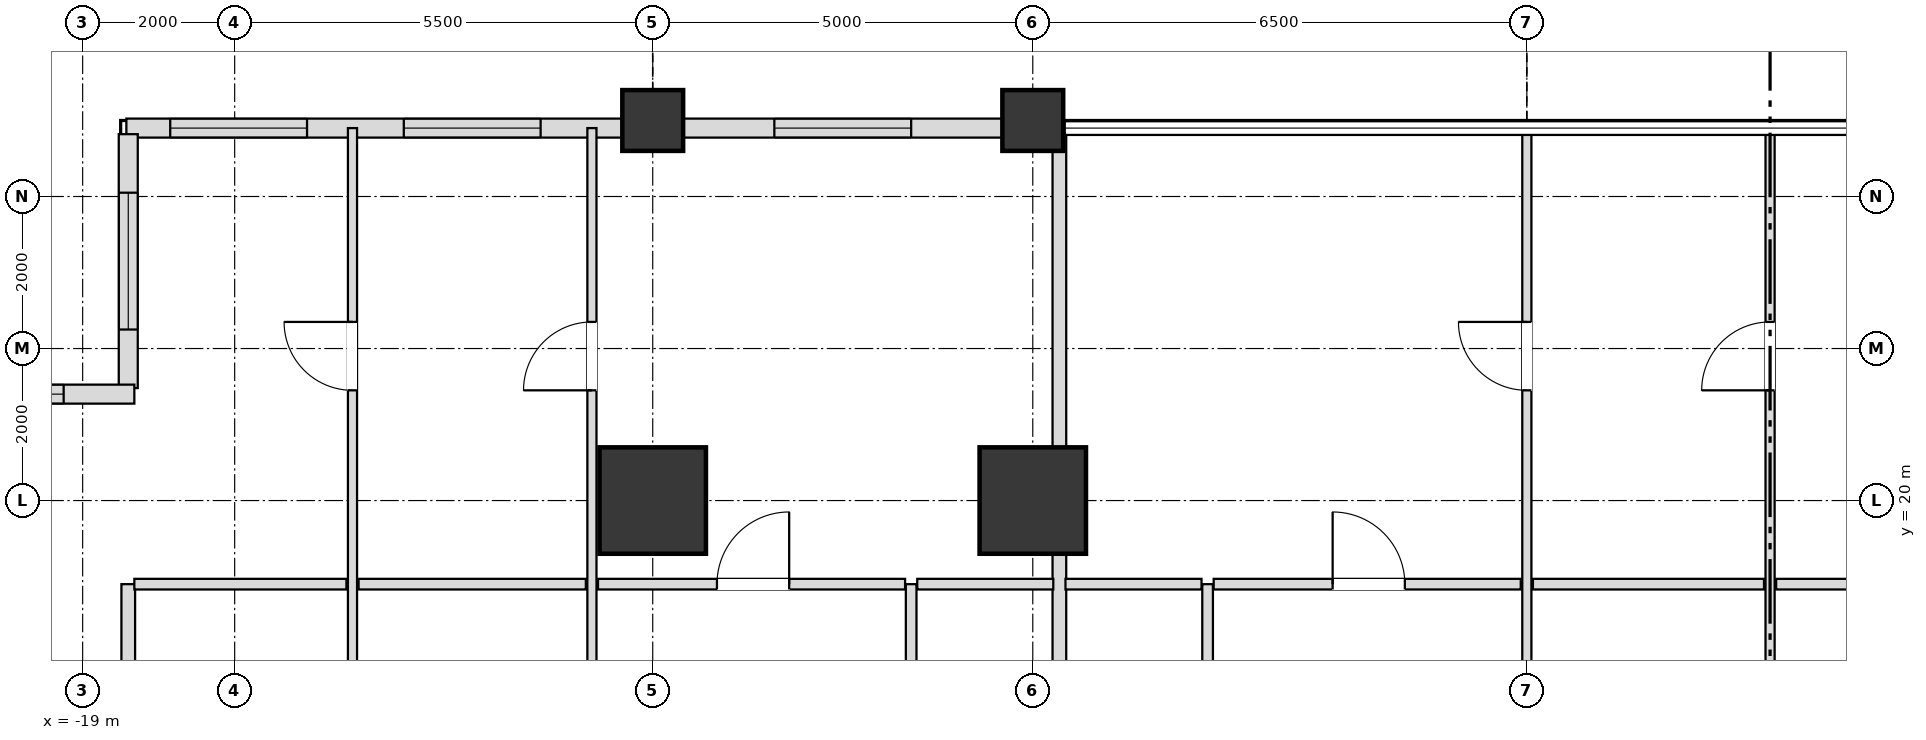
"""IFC4 building model, lengths in metres.
Left out: names, types, materials, properties, quantities, classifications, styles, units other than length and angle.
Written with IfcOpenShell. Run it as: python <this file> out.ifc"""

import sys

from ifc_helpers import new_model, si_unit, direction, frame, frame_2d, origin, origin_2d, place, context, subcontext, project, spatial, rectangle, extrude, element, fill, save


model = new_model("IFC4")
c1 = context("Model", 3, precision=1e-05, world=origin(), true_north=direction((0.0, 1.0)))
c2 = subcontext(c1, "Body", "Model", "MODEL_VIEW")
j1 = project(units=[si_unit("LENGTHUNIT", "METRE"), si_unit("PLANEANGLEUNIT", "RADIAN")], contexts=[c1])
p1 = place(None, origin())
s1 = spatial("IfcSite", under=j1, at=p1, CompositionType="ELEMENT")
p2 = place(p1, origin())
s2 = spatial("IfcBuilding", under=s1, at=p2, CompositionType="ELEMENT")
p3 = place(p2, frame((0.0, 0.0, 39.6)))
s3 = spatial("IfcBuildingStorey", under=s2, at=p3, CompositionType="ELEMENT", Elevation=39.6)
for number, where, z_axis, x_axis in (
    (1, (-6.5, 20.0, 0.0), (0.0, 0.0, 1.0), (1.0, 0.0, 0.0)),
    (2, (-11.5, 20.0, 0.0), (0.0, 0.0, 1.0), (1.0, 0.0, 0.0)),
):
    element("IfcColumn", number, at=place(p3, frame(where, z_axis=z_axis, x_axis=x_axis)), inside=s3, PredefinedType="USERDEFINED", context=c2, shape_type="SweptSolid", body=[
        extrude(rectangle(XDim=1.4, YDim=1.4, at=origin_2d()), origin(), (0.0, 0.0, 1.0), 3.6),
    ])
for number, where, z_axis, x_axis in (
    (3, (-11.5, 25.0, 0.0), (0.0, 0.0, 1.0), (1.0, 0.0, 0.0)),
    (4, (-6.5, 25.0, 0.0), (0.0, 0.0, 1.0), (1.0, 0.0, 0.0)),
):
    element("IfcColumn", number, at=place(p3, frame(where, z_axis=z_axis, x_axis=x_axis)), inside=s3, PredefinedType="COLUMN", context=c2, shape_type="SweptSolid", body=[
        extrude(rectangle(XDim=0.8, YDim=0.8, at=origin_2d()), origin(), (0.0, 0.0, 1.0), 3.6),
    ])
p4 = place(p3, frame((-6.895, 24.9, 0.0), z_axis=(0.0, 0.0, 1.0), x_axis=(-1.0, 0.0, 0.0)))
e5 = element("IfcWall", 5, at=p4, inside=s3, PredefinedType="SOLIDWALL", context=c2, shape_type="SweptSolid", body=[
    extrude(rectangle(XDim=4.21, YDim=0.25, at=frame_2d((2.105, 0.0))), origin(), (0.0, 0.0, 1.0), 2.736),
])
p5 = place(p4, frame((1.205, 0.0, 0.72)))
e6 = element("IfcOpeningElement", 6, at=p5, cuts=e5, PredefinedType="OPENING", context=c2, shape_type="SweptSolid", body=[
    extrude(rectangle(XDim=1.8, YDim=1.68, at=frame_2d((0.9, 0.84))), frame((0.0, 0.135, 0.0), z_axis=(0.0, -1.0, 0.0), x_axis=(1.0, 0.0, 0.0)), (0.0, 0.0, 1.0), 0.27),
])
p6 = place(p3, frame((-11.895, 24.9, 0.0), z_axis=(0.0, 0.0, 1.0), x_axis=(-1.0, 0.0, 0.0)))
e7 = element("IfcWall", 7, at=p6, inside=s3, PredefinedType="SOLIDWALL", context=c2, shape_type="SweptSolid", body=[
    extrude(rectangle(XDim=6.53, YDim=0.25, at=frame_2d((3.265, 0.0))), origin(), (0.0, 0.0, 1.0), 2.736),
])
p7 = place(p6, frame((1.08, 0.0, 0.72)))
e8 = element("IfcOpeningElement", 8, at=p7, cuts=e7, PredefinedType="OPENING", context=c2, shape_type="SweptSolid", body=[
    extrude(rectangle(XDim=1.8, YDim=1.68, at=frame_2d((0.9, 0.84))), frame((0.0, 0.135, 0.0), z_axis=(0.0, -1.0, 0.0), x_axis=(1.0, 0.0, 0.0)), (0.0, 0.0, 1.0), 0.27),
])
p8 = place(p6, frame((4.153, 0.0, 0.72)))
e9 = element("IfcOpeningElement", 9, at=p8, cuts=e7, PredefinedType="OPENING", context=c2, shape_type="SweptSolid", body=[
    extrude(rectangle(XDim=1.8, YDim=1.68, at=frame_2d((0.9, 0.84))), frame((0.0, 0.135, 0.0), z_axis=(0.0, -1.0, 0.0), x_axis=(1.0, 0.0, 0.0)), (0.0, 0.0, 1.0), 0.27),
])
p9 = place(p3, frame((-18.4, 24.82, 0.0), z_axis=(0.0, 0.0, 1.0), x_axis=(0.0, -1.0, 0.0)))
e10 = element("IfcWall", 10, at=p9, inside=s3, PredefinedType="SOLIDWALL", context=c2, shape_type="SweptSolid", body=[
    extrude(rectangle(XDim=3.34, YDim=0.25, at=frame_2d((1.67, 0.0))), origin(), (0.0, 0.0, 1.0), 2.736),
])
p10 = place(p9, frame((0.77, 0.0, 0.72)))
e11 = element("IfcOpeningElement", 11, at=p10, cuts=e10, PredefinedType="OPENING", context=c2, shape_type="SweptSolid", body=[
    extrude(rectangle(XDim=1.8, YDim=1.68, at=frame_2d((0.9, 0.84))), frame((0.0, 0.135, 0.0), z_axis=(0.0, -1.0, 0.0), x_axis=(1.0, 0.0, 0.0)), (0.0, 0.0, 1.0), 0.27),
])
p11 = place(p3, frame((-18.32, 21.4, 0.0), z_axis=(0.0, 0.0, 1.0), x_axis=(-1.0, 0.0, 0.0)))
e12 = element("IfcWall", 12, at=p11, inside=s3, PredefinedType="SOLIDWALL", context=c2, shape_type="SweptSolid", body=[
    extrude(rectangle(XDim=3.66, YDim=0.25, at=frame_2d((1.83, 0.0))), origin(), (0.0, 0.0, 1.0), 2.736),
])
p12 = place(p11, frame((0.93, 0.0, 0.72)))
e13 = element("IfcOpeningElement", 13, at=p12, cuts=e12, PredefinedType="OPENING", context=c2, shape_type="SweptSolid", body=[
    extrude(rectangle(XDim=1.8, YDim=1.68, at=frame_2d((0.9, 0.84))), frame((0.0, 0.135, 0.0), z_axis=(0.0, -1.0, 0.0), x_axis=(1.0, 0.0, 0.0)), (0.0, 0.0, 1.0), 0.27),
])
p13 = place(p3, frame((-18.4, 9.3, 0.0), z_axis=(0.0, 0.0, 1.0), x_axis=(0.0, 1.0, 0.0)))
e14 = element("IfcWall", 14, at=p13, inside=s3, PredefinedType="PARTITIONING", context=c2, shape_type="SweptSolid", body=[
    extrude(rectangle(XDim=9.6, YDim=0.18, at=frame_2d((4.8, 0.0))), origin(), (0.0, 0.0, 1.0), 2.736),
])
p14 = place(p3, frame((-15.45, 9.3, 0.0), z_axis=(0.0, 0.0, 1.0), x_axis=(0.0, 1.0, 0.0)))
e15 = element("IfcWall", 15, at=p14, inside=s3, PredefinedType="PARTITIONING", context=c2, shape_type="SweptSolid", body=[
    extrude(rectangle(XDim=15.6, YDim=0.12, at=frame_2d((7.8, 0.0))), origin(), (0.0, 0.0, 1.0), 2.736),
])
p15 = place(p14, frame((4.478, 0.0, 0.0)))
e16 = element("IfcOpeningElement", 16, at=p15, cuts=e15, PredefinedType="OPENING", context=c2, shape_type="SweptSolid", body=[
    extrude(rectangle(XDim=0.9, YDim=2.1, at=frame_2d((0.45, 1.05))), frame((0.0, 0.07, 0.0), z_axis=(0.0, -1.0, 0.0), x_axis=(1.0, 0.0, 0.0)), (0.0, 0.0, 1.0), 0.14),
])
p16 = place(p14, frame((12.15, 0.0, 0.0)))
e17 = element("IfcOpeningElement", 17, at=p16, cuts=e15, PredefinedType="OPENING", context=c2, shape_type="SweptSolid", body=[
    extrude(rectangle(XDim=0.9, YDim=2.1, at=frame_2d((0.45, 1.05))), frame((0.0, 0.07, 0.0), z_axis=(0.0, -1.0, 0.0), x_axis=(1.0, 0.0, 0.0)), (0.0, 0.0, 1.0), 0.14),
])
p17 = place(p3, frame((-12.3, 9.3, 0.0), z_axis=(0.0, 0.0, 1.0), x_axis=(0.0, 1.0, 0.0)))
e18 = element("IfcWall", 18, at=p17, inside=s3, PredefinedType="PARTITIONING", context=c2, shape_type="SweptSolid", body=[
    extrude(rectangle(XDim=15.6, YDim=0.12, at=frame_2d((7.8, 0.0))), origin(), (0.0, 0.0, 1.0), 2.736),
])
p18 = place(p17, frame((4.325, 0.0, 0.0)))
e19 = element("IfcOpeningElement", 19, at=p18, cuts=e18, PredefinedType="OPENING", context=c2, shape_type="SweptSolid", body=[
    extrude(rectangle(XDim=0.95, YDim=2.1, at=frame_2d((0.475, 1.05))), frame((0.0, 0.07, 0.0), z_axis=(0.0, -1.0, 0.0), x_axis=(1.0, 0.0, 0.0)), (0.0, 0.0, 1.0), 0.14),
])
p19 = place(p17, frame((12.15, 0.0, 0.0)))
e20 = element("IfcOpeningElement", 20, at=p19, cuts=e18, PredefinedType="OPENING", context=c2, shape_type="SweptSolid", body=[
    extrude(rectangle(XDim=0.9, YDim=2.1, at=frame_2d((0.45, 1.05))), frame((0.0, 0.07, 0.0), z_axis=(0.0, -1.0, 0.0), x_axis=(1.0, 0.0, 0.0)), (0.0, 0.0, 1.0), 0.14),
])
p20 = place(p3, frame((-8.1, 9.3, 0.0), z_axis=(0.0, 0.0, 1.0), x_axis=(0.0, 1.0, 0.0)))
e21 = element("IfcWall", 21, at=p20, inside=s3, PredefinedType="PARTITIONING", context=c2, shape_type="SweptSolid", body=[
    extrude(rectangle(XDim=9.6, YDim=0.14, at=frame_2d((4.8, 0.0))), origin(), (0.0, 0.0, 1.0), 2.816),
])
p21 = place(p20, frame((4.35, 0.0, 0.0)))
e22 = element("IfcOpeningElement", 22, at=p21, cuts=e21, PredefinedType="OPENING", context=c2, shape_type="SweptSolid", body=[
    extrude(rectangle(XDim=0.9, YDim=2.1, at=frame_2d((0.45, 1.05))), frame((0.0, 0.08, 0.0), z_axis=(0.0, -1.0, 0.0), x_axis=(1.0, 0.0, 0.0)), (0.0, 0.0, 1.0), 0.16),
])
p22 = place(p3, frame((-6.15, 9.3, 0.0), z_axis=(0.0, 0.0, 1.0), x_axis=(0.0, 1.0, 0.0)))
e23 = element("IfcWall", 23, at=p22, inside=s3, PredefinedType="PARTITIONING", context=c2, shape_type="SweptSolid", body=[
    extrude(rectangle(XDim=15.6, YDim=0.18, at=frame_2d((7.8, 0.0))), origin(), (0.0, 0.0, 1.0), 2.816),
])
p23 = place(p3, frame((-4.2, 9.3, 0.0), z_axis=(0.0, 0.0, 1.0), x_axis=(0.0, 1.0, 0.0)))
e24 = element("IfcWall", 24, at=p23, inside=s3, PredefinedType="PARTITIONING", context=c2, shape_type="SweptSolid", body=[
    extrude(rectangle(XDim=9.6, YDim=0.14, at=frame_2d((4.8, 0.0))), origin(), (0.0, 0.0, 1.0), 2.948),
])
p24 = place(p23, frame((4.35, 0.0, 0.0)))
e25 = element("IfcOpeningElement", 25, at=p24, cuts=e24, PredefinedType="OPENING", context=c2, shape_type="SweptSolid", body=[
    extrude(rectangle(XDim=0.9, YDim=2.1, at=frame_2d((0.45, 1.05))), frame((0.0, 0.08, 0.0), z_axis=(0.0, -1.0, 0.0), x_axis=(1.0, 0.0, 0.0)), (0.0, 0.0, 1.0), 0.16),
])
p25 = place(p3, frame((0.0, 9.3, 0.0), z_axis=(0.0, 0.0, 1.0), x_axis=(0.0, 1.0, 0.0)))
e26 = element("IfcWall", 26, at=p25, inside=s3, PredefinedType="PARTITIONING", context=c2, shape_type="SweptSolid", body=[
    extrude(rectangle(XDim=15.6, YDim=0.12, at=frame_2d((7.8, 0.0))), origin(), (0.0, 0.0, 1.0), 2.816),
])
p26 = place(p25, frame((4.325, 0.0, 0.0)))
e27 = element("IfcOpeningElement", 27, at=p26, cuts=e26, PredefinedType="OPENING", context=c2, shape_type="SweptSolid", body=[
    extrude(rectangle(XDim=0.95, YDim=2.1, at=frame_2d((0.475, 1.05))), frame((0.0, 0.07, 0.0), z_axis=(0.0, -1.0, 0.0), x_axis=(1.0, 0.0, 0.0)), (0.0, 0.0, 1.0), 0.14),
])
p27 = place(p25, frame((12.15, 0.0, 0.0)))
e28 = element("IfcOpeningElement", 28, at=p27, cuts=e26, PredefinedType="OPENING", context=c2, shape_type="SweptSolid", body=[
    extrude(rectangle(XDim=0.9, YDim=2.1, at=frame_2d((0.45, 1.05))), frame((0.0, 0.07, 0.0), z_axis=(0.0, -1.0, 0.0), x_axis=(1.0, 0.0, 0.0)), (0.0, 0.0, 1.0), 0.14),
])
p28 = place(p3, frame((3.2, 9.3, 0.0), z_axis=(0.0, 0.0, 1.0), x_axis=(0.0, 1.0, 0.0)))
e29 = element("IfcWall", 29, at=p28, inside=s3, PredefinedType="PARTITIONING", context=c2, shape_type="SweptSolid", body=[
    extrude(rectangle(XDim=15.6, YDim=0.12, at=frame_2d((7.8, 0.0))), origin(), (0.0, 0.0, 1.0), 2.816),
])
p29 = place(p28, frame((4.35, 0.0, 0.0)))
e30 = element("IfcOpeningElement", 30, at=p29, cuts=e29, PredefinedType="OPENING", context=c2, shape_type="SweptSolid", body=[
    extrude(rectangle(XDim=0.9, YDim=2.1, at=frame_2d((0.45, 1.05))), frame((0.0, 0.07, 0.0), z_axis=(0.0, -1.0, 0.0), x_axis=(1.0, 0.0, 0.0)), (0.0, 0.0, 1.0), 0.14),
])
p30 = place(p28, frame((12.15, 0.0, 0.0)))
e31 = element("IfcOpeningElement", 31, at=p30, cuts=e29, PredefinedType="OPENING", context=c2, shape_type="SweptSolid", body=[
    extrude(rectangle(XDim=0.9, YDim=2.1, at=frame_2d((0.45, 1.05))), frame((0.0, 0.07, 0.0), z_axis=(0.0, -1.0, 0.0), x_axis=(1.0, 0.0, 0.0)), (0.0, 0.0, 1.0), 0.14),
])
p31 = place(p3, frame((-18.32, 18.9, 0.0), z_axis=(0.0, 0.0, 1.0), x_axis=(1.0, 0.0, 0.0)))
e32 = element("IfcWall", 32, at=p31, inside=s3, PredefinedType="PARTITIONING", context=c2, shape_type="SweptSolid", body=[
    extrude(rectangle(XDim=2.79, YDim=0.14, at=frame_2d((1.395, 0.0))), origin(), (0.0, 0.0, 1.0), 2.736),
])
p32 = place(p3, frame((-15.37, 18.9, 0.0), z_axis=(0.0, 0.0, 1.0), x_axis=(1.0, 0.0, 0.0)))
e33 = element("IfcWall", 33, at=p32, inside=s3, PredefinedType="PARTITIONING", context=c2, shape_type="SweptSolid", body=[
    extrude(rectangle(XDim=2.99, YDim=0.14, at=frame_2d((1.495, 0.0))), origin(), (0.0, 0.0, 1.0), 2.736),
])
p33 = place(p3, frame((-12.22, 18.9, 0.0), z_axis=(0.0, 0.0, 1.0), x_axis=(1.0, 0.0, 0.0)))
e34 = element("IfcWall", 34, at=p33, inside=s3, PredefinedType="PARTITIONING", context=c2, shape_type="SweptSolid", body=[
    extrude(rectangle(XDim=4.04, YDim=0.14, at=frame_2d((2.02, 0.0))), origin(), (0.0, 0.0, 1.0), 2.736),
])
p34 = place(p33, frame((1.565, 0.0, 0.0)))
e35 = element("IfcOpeningElement", 35, at=p34, cuts=e34, PredefinedType="OPENING", context=c2, shape_type="SweptSolid", body=[
    extrude(rectangle(XDim=0.95, YDim=2.1, at=frame_2d((0.475, 1.05))), frame((0.0, 0.08, 0.0), z_axis=(0.0, -1.0, 0.0), x_axis=(1.0, 0.0, 0.0)), (0.0, 0.0, 1.0), 0.16),
])
p35 = place(p3, frame((-8.02, 18.9, 0.0), z_axis=(0.0, 0.0, 1.0), x_axis=(1.0, 0.0, 0.0)))
e36 = element("IfcWall", 36, at=p35, inside=s3, PredefinedType="PARTITIONING", context=c2, shape_type="SweptSolid", body=[
    extrude(rectangle(XDim=1.79, YDim=0.14, at=frame_2d((0.895, 0.0))), origin(), (0.0, 0.0, 1.0), 2.816),
])
p36 = place(p3, frame((-6.07, 18.9, 0.0), z_axis=(0.0, 0.0, 1.0), x_axis=(1.0, 0.0, 0.0)))
e37 = element("IfcWall", 37, at=p36, inside=s3, PredefinedType="PARTITIONING", context=c2, shape_type="SweptSolid", body=[
    extrude(rectangle(XDim=1.79, YDim=0.14, at=frame_2d((0.895, 0.0))), origin(), (0.0, 0.0, 1.0), 3.38),
])
p37 = place(p3, frame((-4.12, 18.9, 0.0), z_axis=(0.0, 0.0, 1.0), x_axis=(1.0, 0.0, 0.0)))
e38 = element("IfcWall", 38, at=p37, inside=s3, PredefinedType="PARTITIONING", context=c2, shape_type="SweptSolid", body=[
    extrude(rectangle(XDim=4.04, YDim=0.14, at=frame_2d((2.02, 0.0))), origin(), (0.0, 0.0, 1.0), 3.38),
])
p38 = place(p37, frame((1.565, 0.0, 0.0)))
e39 = element("IfcOpeningElement", 39, at=p38, cuts=e38, PredefinedType="OPENING", context=c2, shape_type="SweptSolid", body=[
    extrude(rectangle(XDim=0.95, YDim=2.1, at=frame_2d((0.475, 1.05))), frame((0.0, 0.08, 0.0), z_axis=(0.0, -1.0, 0.0), x_axis=(1.0, 0.0, 0.0)), (0.0, 0.0, 1.0), 0.16),
])
p39 = place(p3, frame((0.08, 18.9, 0.0), z_axis=(0.0, 0.0, 1.0), x_axis=(1.0, 0.0, 0.0)))
e40 = element("IfcWall", 40, at=p39, inside=s3, PredefinedType="PARTITIONING", context=c2, shape_type="SweptSolid", body=[
    extrude(rectangle(XDim=3.04, YDim=0.14, at=frame_2d((1.52, 0.0))), origin(), (0.0, 0.0, 1.0), 3.38),
])
p40 = place(p3, frame((3.28, 18.9, 0.0), z_axis=(0.0, 0.0, 1.0), x_axis=(1.0, 0.0, 0.0)))
e41 = element("IfcWall", 41, at=p40, inside=s3, PredefinedType="PARTITIONING", context=c2, shape_type="SweptSolid", body=[
    extrude(rectangle(XDim=2.79, YDim=0.14, at=frame_2d((1.395, 0.0))), origin(), (0.0, 0.0, 1.0), 3.38),
])
p41 = place(p5, origin())
e42 = element("IfcWindow", 42, at=p41, inside=s3, PartitioningType="SINGLE_PANEL", PredefinedType="WINDOW", context=c2, shape_type="SweptSolid", body=[
    extrude(rectangle(XDim=1.8, YDim=1.68, at=frame_2d((0.9, 0.84))), frame((0.0, 0.03, 0.0), z_axis=(0.0, -1.0, 0.0), x_axis=(1.0, 0.0, 0.0)), (0.0, 0.0, 1.0), 0.06),
])
fill(e6, e42)
p42 = place(p7, origin())
e43 = element("IfcWindow", 43, at=p42, inside=s3, PartitioningType="SINGLE_PANEL", PredefinedType="WINDOW", context=c2, shape_type="SweptSolid", body=[
    extrude(rectangle(XDim=1.8, YDim=1.68, at=frame_2d((0.9, 0.84))), frame((0.0, 0.03, 0.0), z_axis=(0.0, -1.0, 0.0), x_axis=(1.0, 0.0, 0.0)), (0.0, 0.0, 1.0), 0.06),
])
fill(e8, e43)
p43 = place(p8, origin())
e44 = element("IfcWindow", 44, at=p43, inside=s3, PartitioningType="SINGLE_PANEL", PredefinedType="WINDOW", context=c2, shape_type="SweptSolid", body=[
    extrude(rectangle(XDim=1.8, YDim=1.68, at=frame_2d((0.9, 0.84))), frame((0.0, 0.03, 0.0), z_axis=(0.0, -1.0, 0.0), x_axis=(1.0, 0.0, 0.0)), (0.0, 0.0, 1.0), 0.06),
])
fill(e9, e44)
p44 = place(p10, origin())
e45 = element("IfcWindow", 45, at=p44, inside=s3, PartitioningType="SINGLE_PANEL", PredefinedType="WINDOW", context=c2, shape_type="SweptSolid", body=[
    extrude(rectangle(XDim=1.8, YDim=1.68, at=frame_2d((0.9, 0.84))), frame((0.0, 0.03, 0.0), z_axis=(0.0, -1.0, 0.0), x_axis=(1.0, 0.0, 0.0)), (0.0, 0.0, 1.0), 0.06),
])
fill(e11, e45)
p45 = place(p12, origin())
e46 = element("IfcWindow", 46, at=p45, inside=s3, PartitioningType="SINGLE_PANEL", PredefinedType="WINDOW", context=c2, shape_type="SweptSolid", body=[
    extrude(rectangle(XDim=1.8, YDim=1.68, at=frame_2d((0.9, 0.84))), frame((0.0, 0.03, 0.0), z_axis=(0.0, -1.0, 0.0), x_axis=(1.0, 0.0, 0.0)), (0.0, 0.0, 1.0), 0.06),
])
fill(e13, e46)
p46 = place(p34, origin())
e47 = element("IfcDoor", 47, at=p46, inside=s3, OperationType="SINGLE_SWING_RIGHT", PredefinedType="DOOR", context=c2, shape_type="SweptSolid", body=[
    extrude(rectangle(XDim=0.95, YDim=2.1, at=frame_2d((0.475, 1.05))), frame((0.0, 0.025, 0.0), z_axis=(0.0, -1.0, 0.0), x_axis=(1.0, 0.0, 0.0)), (0.0, 0.0, 1.0), 0.05),
])
fill(e35, e47)
p47 = place(p19, origin())
e48 = element("IfcDoor", 48, at=p47, inside=s3, OperationType="SINGLE_SWING_LEFT", PredefinedType="DOOR", context=c2, shape_type="SweptSolid", body=[
    extrude(rectangle(XDim=0.9, YDim=2.1, at=frame_2d((0.45, 1.05))), frame((0.0, 0.025, 0.0), z_axis=(0.0, -1.0, 0.0), x_axis=(1.0, 0.0, 0.0)), (0.0, 0.0, 1.0), 0.05),
])
fill(e20, e48)
p48 = place(p16, origin())
e49 = element("IfcDoor", 49, at=p48, inside=s3, OperationType="SINGLE_SWING_RIGHT", PredefinedType="DOOR", context=c2, shape_type="SweptSolid", body=[
    extrude(rectangle(XDim=0.9, YDim=2.1, at=frame_2d((0.45, 1.05))), frame((0.0, 0.025, 0.0), z_axis=(0.0, -1.0, 0.0), x_axis=(1.0, 0.0, 0.0)), (0.0, 0.0, 1.0), 0.05),
])
fill(e17, e49)
p49 = place(p38, origin())
e50 = element("IfcDoor", 50, at=p49, inside=s3, OperationType="SINGLE_SWING_LEFT", PredefinedType="DOOR", context=c2, shape_type="SweptSolid", body=[
    extrude(rectangle(XDim=0.95, YDim=2.1, at=frame_2d((0.475, 1.05))), frame((0.0, 0.025, 0.0), z_axis=(0.0, -1.0, 0.0), x_axis=(1.0, 0.0, 0.0)), (0.0, 0.0, 1.0), 0.05),
])
fill(e39, e50)
p50 = place(p27, origin())
e51 = element("IfcDoor", 51, at=p50, inside=s3, OperationType="SINGLE_SWING_RIGHT", PredefinedType="DOOR", context=c2, shape_type="SweptSolid", body=[
    extrude(rectangle(XDim=0.9, YDim=2.1, at=frame_2d((0.45, 1.05))), frame((0.0, 0.025, 0.0), z_axis=(0.0, -1.0, 0.0), x_axis=(1.0, 0.0, 0.0)), (0.0, 0.0, 1.0), 0.05),
])
fill(e28, e51)
p51 = place(p30, origin())
e52 = element("IfcDoor", 52, at=p51, inside=s3, OperationType="SINGLE_SWING_LEFT", PredefinedType="DOOR", context=c2, shape_type="SweptSolid", body=[
    extrude(rectangle(XDim=0.9, YDim=2.1, at=frame_2d((0.45, 1.05))), frame((0.0, 0.025, 0.0), z_axis=(0.0, -1.0, 0.0), x_axis=(1.0, 0.0, 0.0)), (0.0, 0.0, 1.0), 0.05),
])
fill(e31, e52)
save(model, sys.argv[1])
